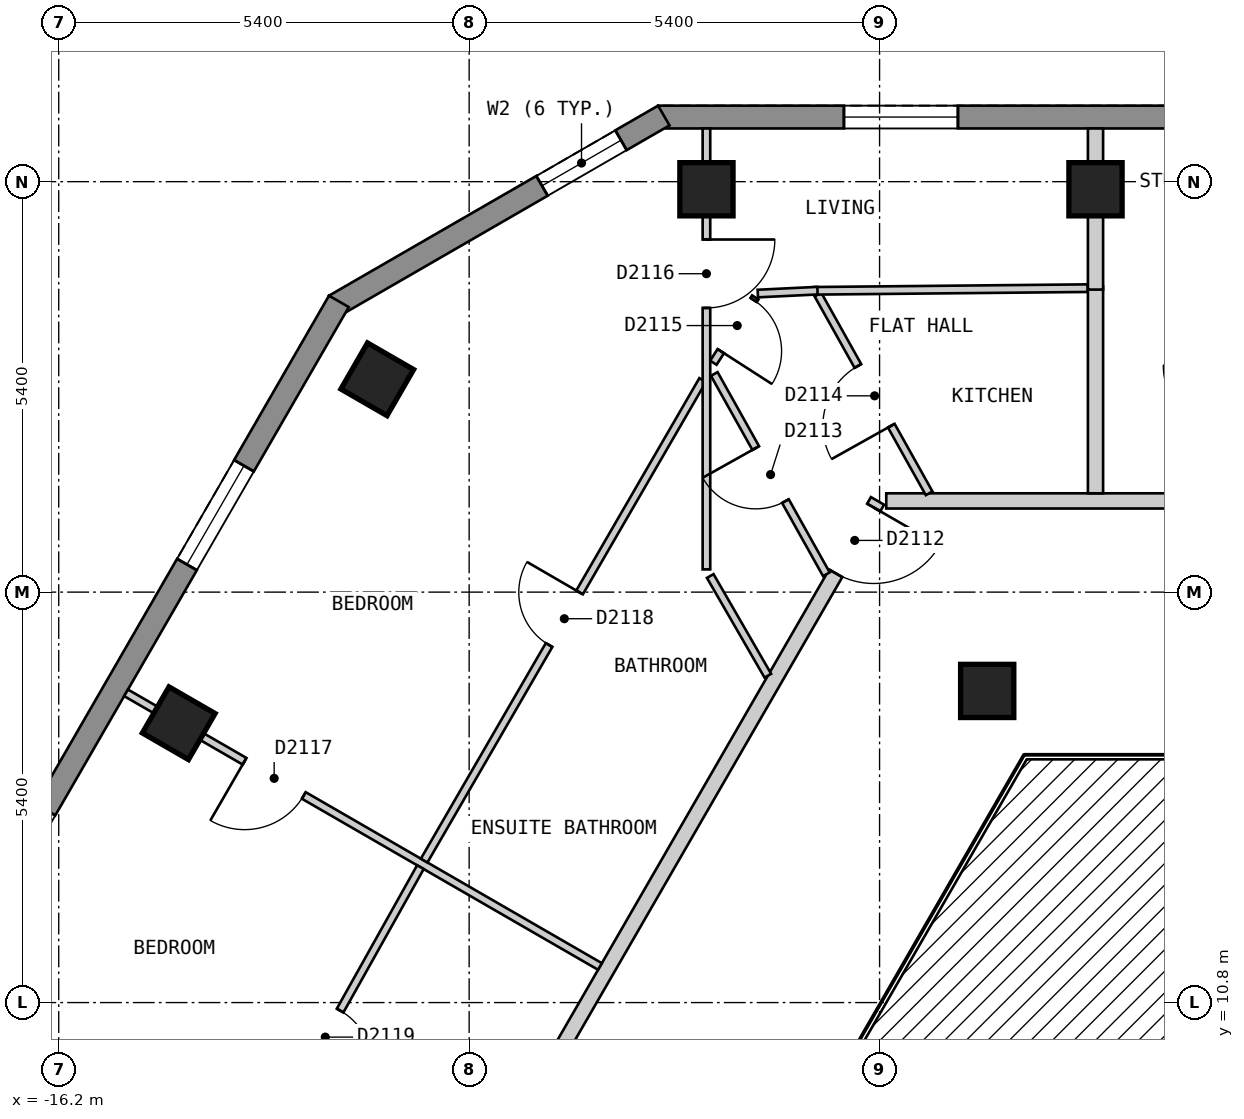
"""IFC4 building model, lengths in metres.
Left out: names, types, materials, properties, quantities, classifications, styles, units other than length and angle.
Written with IfcOpenShell. Run it as: python <this file> out.ifc"""

import sys

from ifc_helpers import new_model, si_unit, direction, frame, frame_2d, origin, origin_2d, place, context, subcontext, project, spatial, polyline, rectangle, outline, extrude, element, fill, save


model = new_model("IFC4")
c1 = context("Model", 3, precision=1e-05, world=origin(), true_north=direction((0.0, 1.0)))
c2 = subcontext(c1, "Body", "Model", "MODEL_VIEW")
j1 = project(units=[si_unit("LENGTHUNIT", "METRE"), si_unit("PLANEANGLEUNIT", "RADIAN")], contexts=[c1])
p1 = place(None, origin())
s1 = spatial("IfcSite", under=j1, at=p1, CompositionType="ELEMENT")
p2 = place(p1, origin())
s2 = spatial("IfcBuilding", under=s1, at=p2, CompositionType="ELEMENT")
p3 = place(p2, frame((0.0, 0.0, 217.8)))
s3 = spatial("IfcBuildingStorey", under=s2, at=p3, CompositionType="ELEMENT", Elevation=217.8)
for number, where, z_axis, x_axis in (
    (1, (-2.559, 21.5, 0.0), (0.0, 0.0, 1.0), (-1.0, 0.0, 0.0)),
    (2, (-7.678, 21.5, 0.0), (0.0, 0.0, 1.0), (-1.0, 0.0, 0.0)),
    (3, (-12.009, 19.0, 0.0), (0.0, 0.0, 1.0), (-0.5, -0.866, 0.0)),
    (4, (-14.621, 14.475, 0.0), (0.0, 0.0, 1.0), (-0.5, -0.866, 0.0)),
    (5, (-3.984, 14.9, 0.0), (0.0, 0.0, 1.0), (1.0, 0.0, 0.0)),
):
    element("IfcColumn", number, at=place(p3, frame(where, z_axis=z_axis, x_axis=x_axis)), inside=s3, PredefinedType="COLUMN", context=c2, shape_type="SweptSolid", body=[
        extrude(rectangle(XDim=0.7, YDim=0.7, at=origin_2d()), origin(), (0.0, 0.0, 1.0), 3.0),
    ])
p4 = place(p3, frame((8.314, 22.45, 0.0), z_axis=(0.0, 0.0, 1.0), x_axis=(-1.0, 0.0, 0.0)))
e6 = element("IfcWall", 6, at=p4, inside=s3, PredefinedType="SOLIDWALL", context=c2, shape_type="SweptSolid", body=[
    extrude(outline(polyline([(0.0, -0.15), (16.628, -0.15), (16.548, 0.15), (0.08, 0.15), (0.0, -0.15)])), origin(), (0.0, 0.0, 1.0), 2.7),
])
p5 = place(p4, frame((2.444, 0.0, 0.15)))
e7 = element("IfcOpeningElement", 7, at=p5, cuts=e6, PredefinedType="OPENING", context=c2, shape_type="SweptSolid", body=[
    extrude(rectangle(XDim=1.5, YDim=2.1, at=frame_2d((0.75, 1.05))), frame((0.0, 0.16, 0.0), z_axis=(0.0, -1.0, 0.0), x_axis=(1.0, 0.0, 0.0)), (0.0, 0.0, 1.0), 0.32),
])
p6 = place(p4, frame((7.564, 0.0, 0.15)))
e8 = element("IfcOpeningElement", 8, at=p6, cuts=e6, PredefinedType="OPENING", context=c2, shape_type="SweptSolid", body=[
    extrude(rectangle(XDim=1.5, YDim=2.1, at=frame_2d((0.75, 1.05))), frame((0.0, 0.16, 0.0), z_axis=(0.0, -1.0, 0.0), x_axis=(1.0, 0.0, 0.0)), (0.0, 0.0, 1.0), 0.32),
])
p7 = place(p4, frame((12.683, 0.0, 0.15)))
e9 = element("IfcOpeningElement", 9, at=p7, cuts=e6, PredefinedType="OPENING", context=c2, shape_type="SweptSolid", body=[
    extrude(rectangle(XDim=1.5, YDim=2.1, at=frame_2d((0.75, 1.05))), frame((0.0, 0.16, 0.0), z_axis=(0.0, -1.0, 0.0), x_axis=(1.0, 0.0, 0.0)), (0.0, 0.0, 1.0), 0.32),
])
p8 = place(p3, frame((-8.239, 22.47, 0.0), z_axis=(0.0, 0.0, 1.0), x_axis=(-0.866022959057, -0.500004234368, 0.0)))
e10 = element("IfcWall", 10, at=p8, inside=s3, PredefinedType="SOLIDWALL", context=c2, shape_type="SweptSolid", body=[
    extrude(outline(polyline([(0.0, -0.15), (5.0, -0.15), (4.92, 0.15), (0.08, 0.15), (0.0, -0.15)])), origin(), (0.0, 0.0, 1.0), 2.7),
])
p9 = place(p8, frame((0.65, 0.0, 0.15)))
e11 = element("IfcOpeningElement", 11, at=p9, cuts=e10, PredefinedType="OPENING", context=c2, shape_type="SweptSolid", body=[
    extrude(rectangle(XDim=1.2, YDim=2.1, at=frame_2d((0.6, 1.05))), frame((0.0, 0.16, 0.0), z_axis=(0.0, -1.0, 0.0), x_axis=(1.0, 0.0, 0.0)), (0.0, 0.0, 1.0), 0.32),
])
p10 = place(p3, frame((-12.514, 20.025, 0.0), z_axis=(0.0, 0.0, 1.0), x_axis=(-0.500003656944, -0.866023292436, 0.0)))
e12 = element("IfcWall", 12, at=p10, inside=s3, PredefinedType="SOLIDWALL", context=c2, shape_type="SweptSolid", body=[
    extrude(outline(polyline([(0.0, -0.15), (22.17, -0.15), (22.09, 0.15), (0.08, 0.15), (0.0, -0.15)])), origin(), (0.0, 0.0, 1.0), 2.7),
])
p11 = place(p10, frame((2.497, 0.0, 0.15)))
e13 = element("IfcOpeningElement", 13, at=p11, cuts=e12, PredefinedType="OPENING", context=c2, shape_type="SweptSolid", body=[
    extrude(rectangle(XDim=1.5, YDim=2.1, at=frame_2d((0.75, 1.05))), frame((0.0, 0.16, 0.0), z_axis=(0.0, -1.0, 0.0), x_axis=(1.0, 0.0, 0.0)), (0.0, 0.0, 1.0), 0.32),
])
p12 = place(p10, frame((7.722, 0.0, 0.15)))
e14 = element("IfcOpeningElement", 14, at=p12, cuts=e12, PredefinedType="OPENING", context=c2, shape_type="SweptSolid", body=[
    extrude(rectangle(XDim=1.5, YDim=2.1, at=frame_2d((0.75, 1.05))), frame((0.0, 0.16, 0.0), z_axis=(0.0, -1.0, 0.0), x_axis=(1.0, 0.0, 0.0)), (0.0, 0.0, 1.0), 0.32),
])
p13 = place(p10, frame((12.948, 0.0, 0.15)))
e15 = element("IfcOpeningElement", 15, at=p13, cuts=e12, PredefinedType="OPENING", context=c2, shape_type="SweptSolid", body=[
    extrude(rectangle(XDim=1.5, YDim=2.1, at=frame_2d((0.75, 1.05))), frame((0.0, 0.16, 0.0), z_axis=(0.0, -1.0, 0.0), x_axis=(1.0, 0.0, 0.0)), (0.0, 0.0, 1.0), 0.32),
])
p14 = place(p10, frame((18.173, 0.0, 0.15)))
e16 = element("IfcOpeningElement", 16, at=p14, cuts=e12, PredefinedType="OPENING", context=c2, shape_type="SweptSolid", body=[
    extrude(rectangle(XDim=1.5, YDim=2.1, at=frame_2d((0.75, 1.05))), frame((0.0, 0.16, 0.0), z_axis=(0.0, -1.0, 0.0), x_axis=(1.0, 0.0, 0.0)), (0.0, 0.0, 1.0), 0.32),
])
p15 = place(p3, frame((-5.312, 17.4, 0.0), z_axis=(0.0, 0.0, 1.0), x_axis=(1.0, 0.0, 0.0)))
e17 = element("IfcWall", 17, at=p15, inside=s3, PredefinedType="PARTITIONING", context=c2, shape_type="SweptSolid", body=[
    extrude(rectangle(XDim=10.739, YDim=0.2, at=frame_2d((5.37, 0.0))), origin(), (0.0, 0.0, 1.0), 2.7),
])
p16 = place(p15, frame((9.534, 0.0, 0.0)))
e18 = element("IfcOpeningElement", 18, at=p16, cuts=e17, PredefinedType="OPENING", context=c2, shape_type="SweptSolid", body=[
    extrude(rectangle(XDim=1.0, YDim=2.1, at=frame_2d((0.5, 1.05))), frame((0.0, 0.11, 0.0), z_axis=(0.0, -1.0, 0.0), x_axis=(1.0, 0.0, 0.0)), (0.0, 0.0, 1.0), 0.22),
])
p17 = place(p15, frame((4.812, 0.0, 0.0)))
e19 = element("IfcOpeningElement", 19, at=p17, cuts=e17, PredefinedType="OPENING", context=c2, shape_type="SweptSolid", body=[
    extrude(rectangle(XDim=1.0, YDim=2.1, at=frame_2d((0.5, 1.05))), frame((0.0, 0.11, 0.0), z_axis=(0.0, -1.0, 0.0), x_axis=(1.0, 0.0, 0.0)), (0.0, 0.0, 1.0), 0.22),
])
p18 = place(p3, frame((-10.854, 8.0, 0.0), z_axis=(0.0, 0.0, 1.0), x_axis=(0.499997637144, 0.866026767976, 0.0)))
e20 = element("IfcWall", 20, at=p18, inside=s3, PredefinedType="PARTITIONING", context=c2, shape_type="SweptSolid", body=[
    extrude(rectangle(XDim=10.854, YDim=0.2, at=frame_2d((5.427, 0.0))), origin(), (0.0, 0.0, 1.0), 2.7),
])
p19 = place(p18, frame((9.754, 0.0, 0.0)))
e21 = element("IfcOpeningElement", 21, at=p19, cuts=e20, PredefinedType="OPENING", context=c2, shape_type="SweptSolid", body=[
    extrude(rectangle(XDim=1.0, YDim=2.1, at=frame_2d((0.5, 1.05))), frame((0.0, 0.11, 0.0), z_axis=(0.0, -1.0, 0.0), x_axis=(1.0, 0.0, 0.0)), (0.0, 0.0, 1.0), 0.22),
])
p20 = place(p3, frame((-7.628, 16.412, 0.0), z_axis=(0.0, 0.0, 1.0), x_axis=(0.500159472144, -0.86593331292, 0.0)))
e22 = element("IfcWall", 22, at=p20, inside=s3, PredefinedType="PARTITIONING", context=c2, shape_type="SweptSolid", body=[
    extrude(rectangle(XDim=1.515, YDim=0.1, at=frame_2d((0.758, 0.0))), origin(), (0.0, 0.0, 1.0), 2.7),
])
p21 = place(p3, frame((-6.211, 20.115, 0.0), z_axis=(0.0, 0.0, 1.0), x_axis=(0.488221234931, -0.872719901092, 0.0)))
e23 = element("IfcWall", 23, at=p21, inside=s3, PredefinedType="PARTITIONING", context=c2, shape_type="SweptSolid", body=[
    extrude(rectangle(XDim=2.996, YDim=0.1, at=frame_2d((1.498, 0.0))), origin(), (0.0, 0.0, 1.0), 2.7),
])
p22 = place(p21, frame((1.077, 0.0, 0.0)))
e24 = element("IfcOpeningElement", 24, at=p22, cuts=e23, PredefinedType="OPENING", context=c2, shape_type="SweptSolid", body=[
    extrude(rectangle(XDim=0.9, YDim=2.1, at=frame_2d((0.45, 1.05))), frame((0.0, 0.06, 0.0), z_axis=(0.0, -1.0, 0.0), x_axis=(1.0, 0.0, 0.0)), (0.0, 0.0, 1.0), 0.12),
])
p23 = place(p3, frame((-7.575, 19.07, 0.0), z_axis=(0.0, 0.0, 1.0), x_axis=(0.488413788688, -0.872612153834, 0.0)))
e25 = element("IfcWall", 25, at=p23, inside=s3, PredefinedType="PARTITIONING", context=c2, shape_type="SweptSolid", body=[
    extrude(rectangle(XDim=3.02, YDim=0.1, at=frame_2d((1.51, 0.0))), origin(), (0.0, 0.0, 1.0), 2.7),
])
p24 = place(p23, frame((1.117, 0.0, 0.0)))
e26 = element("IfcOpeningElement", 26, at=p24, cuts=e25, PredefinedType="OPENING", context=c2, shape_type="SweptSolid", body=[
    extrude(rectangle(XDim=0.8, YDim=2.1, at=frame_2d((0.4, 1.05))), frame((0.0, 0.06, 0.0), z_axis=(0.0, -1.0, 0.0), x_axis=(1.0, 0.0, 0.0)), (0.0, 0.0, 1.0), 0.12),
])
p25 = place(p3, frame((-15.314, 14.875, 0.0), z_axis=(0.0, 0.0, 1.0), x_axis=(0.866001485781, -0.500041424909, 0.0)))
e27 = element("IfcWall", 27, at=p25, inside=s3, PredefinedType="PARTITIONING", context=c2, shape_type="SweptSolid", body=[
    extrude(rectangle(XDim=7.2, YDim=0.1, at=frame_2d((3.6, 0.0))), origin(), (0.0, 0.0, 1.0), 2.7),
])
p26 = place(p25, frame((1.8, 0.0, 0.0)))
e28 = element("IfcOpeningElement", 28, at=p26, cuts=e27, PredefinedType="OPENING", context=c2, shape_type="SweptSolid", body=[
    extrude(rectangle(XDim=0.9, YDim=2.1, at=frame_2d((0.45, 1.05))), frame((0.0, 0.06, 0.0), z_axis=(0.0, -1.0, 0.0), x_axis=(1.0, 0.0, 0.0)), (0.0, 0.0, 1.0), 0.12),
])
p27 = place(p3, frame((-6.259, 20.164, 0.0), z_axis=(0.0, 0.0, 1.0), x_axis=(0.999952982126, 0.009697089139, 0.0)))
e29 = element("IfcWall", 29, at=p27, inside=s3, PredefinedType="PARTITIONING", context=c2, shape_type="SweptSolid", body=[
    extrude(rectangle(XDim=3.6, YDim=0.1, at=frame_2d((1.8, 0.0))), origin(), (0.0, 0.0, 1.0), 2.7),
])
p28 = place(p3, frame((-7.587, 19.218, 0.0), z_axis=(0.0, 0.0, 1.0), x_axis=(0.54066090195, 0.841240624972, 0.0)))
e30 = element("IfcWall", 30, at=p28, inside=s3, PredefinedType="PARTITIONING", context=c2, shape_type="SweptSolid", body=[
    extrude(rectangle(XDim=1.021, YDim=0.1, at=frame_2d((0.51, 0.0))), origin(), (0.0, 0.0, 1.0), 2.7),
])
p29 = place(p28, frame((0.181, 0.0, 0.0)))
e31 = element("IfcOpeningElement", 31, at=p29, cuts=e30, PredefinedType="OPENING", context=c2, shape_type="SweptSolid", body=[
    extrude(rectangle(XDim=0.8, YDim=2.1, at=frame_2d((0.4, 1.05))), frame((0.0, 0.06, 0.0), z_axis=(0.0, -1.0, 0.0), x_axis=(1.0, 0.0, 0.0)), (0.0, 0.0, 1.0), 0.12),
])
p30 = place(p3, frame((-11.392, 12.668, 0.0), z_axis=(0.0, 0.0, 1.0), x_axis=(0.501440551074, 0.865192102217, 0.0)))
e32 = element("IfcWall", 32, at=p30, inside=s3, PredefinedType="PARTITIONING", context=c2, shape_type="SweptSolid", body=[
    extrude(rectangle(XDim=7.307, YDim=0.1, at=frame_2d((3.654, 0.0))), origin(), (0.0, 0.0, 1.0), 2.7),
])
p31 = place(p30, frame((3.278, 0.0, 0.0)))
e33 = element("IfcOpeningElement", 33, at=p31, cuts=e32, PredefinedType="OPENING", context=c2, shape_type="SweptSolid", body=[
    extrude(rectangle(XDim=0.8, YDim=2.1, at=frame_2d((0.4, 1.05))), frame((0.0, 0.06, 0.0), z_axis=(0.0, -1.0, 0.0), x_axis=(1.0, 0.0, 0.0)), (0.0, 0.0, 1.0), 0.12),
])
p32 = place(p3, frame((-13.921, 8.153, 0.0), z_axis=(0.0, 0.0, 1.0), x_axis=(0.488568218554, 0.872525699231, 0.0)))
e34 = element("IfcWall", 34, at=p32, inside=s3, PredefinedType="PARTITIONING", context=c2, shape_type="SweptSolid", body=[
    extrude(rectangle(XDim=5.076, YDim=0.1, at=frame_2d((2.538, 0.0))), origin(), (0.0, 0.0, 1.0), 2.7),
])
p33 = place(p32, frame((2.113, 0.0, 0.0)))
e35 = element("IfcOpeningElement", 35, at=p33, cuts=e34, PredefinedType="OPENING", context=c2, shape_type="SweptSolid", body=[
    extrude(rectangle(XDim=0.8, YDim=2.1, at=frame_2d((0.4, 1.05))), frame((0.0, 0.06, 0.0), z_axis=(0.0, -1.0, 0.0), x_axis=(1.0, 0.0, 0.0)), (0.0, 0.0, 1.0), 0.12),
])
p34 = place(p3, frame((-7.678, 16.499, 0.0), z_axis=(0.0, 0.0, 1.0), x_axis=(0.0, 1.0, 0.0)))
e36 = element("IfcWall", 36, at=p34, inside=s3, PredefinedType="PARTITIONING", context=c2, shape_type="SweptSolid", body=[
    extrude(rectangle(XDim=5.801, YDim=0.1, at=frame_2d((2.9, 0.0))), origin(), (0.0, 0.0, 1.0), 2.7),
])
p35 = place(p34, frame((3.44, 0.0, 0.0)))
e37 = element("IfcOpeningElement", 37, at=p35, cuts=e36, PredefinedType="OPENING", context=c2, shape_type="SweptSolid", body=[
    extrude(rectangle(XDim=0.9, YDim=2.1, at=frame_2d((0.45, 1.05))), frame((0.0, 0.06, 0.0), z_axis=(0.0, -1.0, 0.0), x_axis=(1.0, 0.0, 0.0)), (0.0, 0.0, 1.0), 0.12),
])
p36 = place(p3, frame((-7.002, 20.128, 0.0), z_axis=(0.0, 0.0, 1.0), x_axis=(0.998824855741, 0.048465529548, 0.0)))
e38 = element("IfcWall", 38, at=p36, inside=s3, PredefinedType="PARTITIONING", context=c2, shape_type="SweptSolid", body=[
    extrude(rectangle(XDim=0.786, YDim=0.1, at=frame_2d((0.393, 0.0))), origin(), (0.0, 0.0, 1.0), 2.7),
])
p37 = place(p3, frame((-2.559, 20.22, 0.0), z_axis=(0.0, 0.0, 1.0), x_axis=(0.0, -1.0, 0.0)))
e39 = element("IfcWall", 39, at=p37, inside=s3, PredefinedType="PARTITIONING", context=c2, shape_type="SweptSolid", body=[
    extrude(rectangle(XDim=2.72, YDim=0.2, at=frame_2d((1.36, 0.0))), origin(), (0.0, 0.0, 1.0), 2.7),
])
p38 = place(p3, frame((-17.926, 10.35, 0.0), z_axis=(0.0, 0.0, 1.0), x_axis=(0.866018411306, -0.500012111133, 0.0)))
e40 = element("IfcWall", 40, at=p38, inside=s3, PredefinedType="PARTITIONING", context=c2, shape_type="SweptSolid", body=[
    extrude(rectangle(XDim=9.898, YDim=0.2, at=frame_2d((4.949, 0.0))), origin(), (0.0, 0.0, 1.0), 2.7),
])
p39 = place(p3, frame((-2.559, 20.18, 0.0), z_axis=(0.0, 0.0, 1.0), x_axis=(0.0, 1.0, 0.0)))
e41 = element("IfcWall", 41, at=p39, inside=s3, PredefinedType="PARTITIONING", context=c2, shape_type="SweptSolid", body=[
    extrude(rectangle(XDim=2.12, YDim=0.2, at=frame_2d((1.06, 0.0))), origin(), (0.0, 0.0, 1.0), 2.7),
])
p40 = place(p7, origin())
e42 = element("IfcWindow", 42, at=p40, inside=s3, PartitioningType="SINGLE_PANEL", PredefinedType="WINDOW", context=c2, shape_type="SweptSolid", body=[
    extrude(rectangle(XDim=1.5, YDim=2.1, at=frame_2d((0.75, 1.05))), frame((0.0, 0.03, 0.0), z_axis=(0.0, -1.0, 0.0), x_axis=(1.0, 0.0, 0.0)), (0.0, 0.0, 1.0), 0.06),
])
fill(e9, e42)
p41 = place(p9, origin())
e43 = element("IfcWindow", 43, at=p41, inside=s3, PartitioningType="SINGLE_PANEL", PredefinedType="WINDOW", context=c2, shape_type="SweptSolid", body=[
    extrude(rectangle(XDim=1.2, YDim=2.1, at=frame_2d((0.6, 1.05))), frame((0.0, 0.03, 0.0), z_axis=(0.0, -1.0, 0.0), x_axis=(1.0, 0.0, 0.0)), (0.0, 0.0, 1.0), 0.06),
])
fill(e11, e43)
p42 = place(p11, origin())
e44 = element("IfcWindow", 44, at=p42, inside=s3, PartitioningType="SINGLE_PANEL", PredefinedType="WINDOW", context=c2, shape_type="SweptSolid", body=[
    extrude(rectangle(XDim=1.5, YDim=2.1, at=frame_2d((0.75, 1.05))), frame((0.0, 0.03, 0.0), z_axis=(0.0, -1.0, 0.0), x_axis=(1.0, 0.0, 0.0)), (0.0, 0.0, 1.0), 0.06),
])
fill(e13, e44)
p43 = place(p19, origin())
e45 = element("IfcDoor", 45, at=p43, inside=s3, OperationType="SINGLE_SWING_RIGHT", PredefinedType="DOOR", context=c2, shape_type="SweptSolid", body=[
    extrude(rectangle(XDim=1.0, YDim=2.1, at=frame_2d((0.5, 1.05))), frame((0.0, 0.025, 0.0), z_axis=(0.0, -1.0, 0.0), x_axis=(1.0, 0.0, 0.0)), (0.0, 0.0, 1.0), 0.05),
])
fill(e21, e45)
p44 = place(p24, origin())
e46 = element("IfcDoor", 46, at=p44, inside=s3, OperationType="SINGLE_SWING_LEFT", PredefinedType="DOOR", context=c2, shape_type="SweptSolid", body=[
    extrude(rectangle(XDim=0.8, YDim=2.1, at=frame_2d((0.4, 1.05))), frame((0.0, 0.025, 0.0), z_axis=(0.0, -1.0, 0.0), x_axis=(1.0, 0.0, 0.0)), (0.0, 0.0, 1.0), 0.05),
])
fill(e26, e46)
p45 = place(p22, origin())
e47 = element("IfcDoor", 47, at=p45, inside=s3, OperationType="SINGLE_SWING_RIGHT", PredefinedType="DOOR", context=c2, shape_type="SweptSolid", body=[
    extrude(rectangle(XDim=0.9, YDim=2.1, at=frame_2d((0.45, 1.05))), frame((0.0, 0.025, 0.0), z_axis=(0.0, -1.0, 0.0), x_axis=(1.0, 0.0, 0.0)), (0.0, 0.0, 1.0), 0.05),
])
fill(e24, e47)
p46 = place(p29, origin())
e48 = element("IfcDoor", 48, at=p46, inside=s3, OperationType="SINGLE_SWING_LEFT", PredefinedType="DOOR", context=c2, shape_type="SweptSolid", body=[
    extrude(rectangle(XDim=0.8, YDim=2.1, at=frame_2d((0.4, 1.05))), frame((0.0, 0.025, 0.0), z_axis=(0.0, -1.0, 0.0), x_axis=(1.0, 0.0, 0.0)), (0.0, 0.0, 1.0), 0.05),
])
fill(e31, e48)
p47 = place(p35, origin())
e49 = element("IfcDoor", 49, at=p47, inside=s3, OperationType="SINGLE_SWING_RIGHT", PredefinedType="DOOR", context=c2, shape_type="SweptSolid", body=[
    extrude(rectangle(XDim=0.9, YDim=2.1, at=frame_2d((0.45, 1.05))), frame((0.0, 0.025, 0.0), z_axis=(0.0, -1.0, 0.0), x_axis=(1.0, 0.0, 0.0)), (0.0, 0.0, 1.0), 0.05),
])
fill(e37, e49)
p48 = place(p26, origin())
e50 = element("IfcDoor", 50, at=p48, inside=s3, OperationType="SINGLE_SWING_LEFT", PredefinedType="DOOR", context=c2, shape_type="SweptSolid", body=[
    extrude(rectangle(XDim=0.9, YDim=2.1, at=frame_2d((0.45, 1.05))), frame((0.0, 0.025, 0.0), z_axis=(0.0, -1.0, 0.0), x_axis=(1.0, 0.0, 0.0)), (0.0, 0.0, 1.0), 0.05),
])
fill(e28, e50)
p49 = place(p31, origin())
e51 = element("IfcDoor", 51, at=p49, inside=s3, OperationType="SINGLE_SWING_RIGHT", PredefinedType="DOOR", context=c2, shape_type="SweptSolid", body=[
    extrude(rectangle(XDim=0.8, YDim=2.1, at=frame_2d((0.4, 1.05))), frame((0.0, 0.025, 0.0), z_axis=(0.0, -1.0, 0.0), x_axis=(1.0, 0.0, 0.0)), (0.0, 0.0, 1.0), 0.05),
])
fill(e33, e51)
p50 = place(p33, origin())
e52 = element("IfcDoor", 52, at=p50, inside=s3, OperationType="SINGLE_SWING_LEFT", PredefinedType="DOOR", context=c2, shape_type="SweptSolid", body=[
    extrude(rectangle(XDim=0.8, YDim=2.1, at=frame_2d((0.4, 1.05))), frame((0.0, 0.025, 0.0), z_axis=(0.0, -1.0, 0.0), x_axis=(1.0, 0.0, 0.0)), (0.0, 0.0, 1.0), 0.05),
])
fill(e35, e52)
save(model, sys.argv[1])
